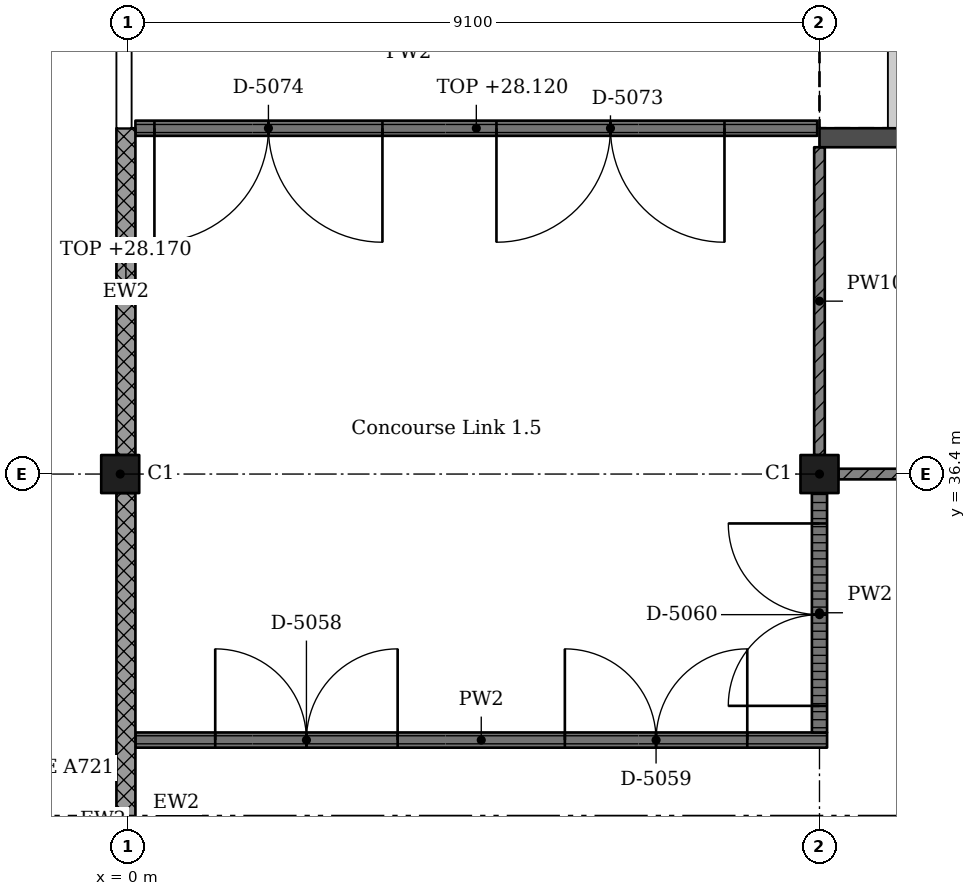
"""IFC4 building model, lengths in metres.
Left out: names, types, materials, properties, quantities, classifications, styles, units other than length and angle.
Written with IfcOpenShell. Run it as: python <this file> out.ifc"""

import sys

from ifc_helpers import new_model, si_unit, direction, frame, frame_2d, origin, origin_2d, place, context, subcontext, project, spatial, rectangle, extrude, element, fill, save


model = new_model("IFC4")
c1 = context("Model", 3, precision=1e-05, world=origin(), true_north=direction((0.0, 1.0)))
c2 = subcontext(c1, "Body", "Model", "MODEL_VIEW")
j1 = project(units=[si_unit("LENGTHUNIT", "METRE"), si_unit("PLANEANGLEUNIT", "RADIAN")], contexts=[c1])
p1 = place(None, origin())
s1 = spatial("IfcSite", under=j1, at=p1, CompositionType="ELEMENT")
p2 = place(p1, origin())
s2 = spatial("IfcBuilding", under=s1, at=p2, CompositionType="ELEMENT")
p3 = place(p2, frame((0.0, 0.0, 24.57)))
s3 = spatial("IfcBuildingStorey", under=s2, at=p3, CompositionType="ELEMENT", Elevation=24.57)
for number, where, z_axis, x_axis in (
    (1, (-0.1, 36.4, 0.0), (0.0, 0.0, 1.0), (1.0, 0.0, 0.0)),
    (2, (9.1, 36.4, 0.0), (0.0, 0.0, 1.0), (1.0, 0.0, 0.0)),
):
    element("IfcColumn", number, at=place(p3, frame(where, z_axis=z_axis, x_axis=x_axis)), inside=s3, PredefinedType="COLUMN", context=c2, shape_type="SweptSolid", body=[
        extrude(rectangle(XDim=0.5, YDim=0.5, at=origin_2d()), origin(), (0.0, 0.0, 1.0), 4.55),
    ])
p4 = place(p3, frame((40.95, 40.825, 0.0), z_axis=(0.0, 0.0, 1.0), x_axis=(-1.0, 0.0, 0.0)))
e3 = element("IfcWall", 3, at=p4, inside=s3, PredefinedType="SHEAR", context=c2, shape_type="SweptSolid", body=[
    extrude(rectangle(XDim=31.85, YDim=0.25, at=frame_2d((15.925, 0.0))), origin(), (0.0, 0.0, 1.0), 4.55),
])
p5 = place(p3, frame((-0.025, 40.95, 0.0), z_axis=(0.0, 0.0, 1.0), x_axis=(0.0, -1.0, 0.0)))
e4 = element("IfcWall", 4, at=p5, inside=s3, PredefinedType="SOLIDWALL", context=c2, shape_type="SweptSolid", body=[
    extrude(rectangle(XDim=4.3, YDim=0.25, at=frame_2d((2.15, 0.0))), origin(), (0.0, 0.0, 1.0), 3.6),
])
p6 = place(p3, frame((-0.025, 36.15, 0.0), z_axis=(0.0, 0.0, 1.0), x_axis=(0.0, -1.0, 0.0)))
e5 = element("IfcWall", 5, at=p6, inside=s3, PredefinedType="SOLIDWALL", context=c2, shape_type="SweptSolid", body=[
    extrude(rectangle(XDim=8.6, YDim=0.25, at=frame_2d((4.3, 0.0))), origin(), (0.0, 0.0, 1.0), 3.6),
])
p7 = place(p3, frame((0.1, 32.9, 0.0), z_axis=(0.0, 0.0, 1.0), x_axis=(1.0, 0.0, 0.0)))
e6 = element("IfcWall", 6, at=p7, inside=s3, PredefinedType="PARTITIONING", context=c2, shape_type="SweptSolid", body=[
    extrude(rectangle(XDim=9.1, YDim=0.2, at=frame_2d((4.55, 0.0))), origin(), (0.0, 0.0, 1.0), 4.35),
])
p8 = place(p7, frame((1.05, 0.0, 0.0)))
e7 = element("IfcOpeningElement", 7, at=p8, cuts=e6, PredefinedType="OPENING", context=c2, shape_type="SweptSolid", body=[
    extrude(rectangle(XDim=2.4, YDim=2.4, at=frame_2d((1.2, 1.2))), frame((0.0, 0.11, 0.0), z_axis=(0.0, -1.0, 0.0), x_axis=(1.0, 0.0, 0.0)), (0.0, 0.0, 1.0), 0.22),
])
p9 = place(p7, frame((5.65, 0.0, 0.0)))
e8 = element("IfcOpeningElement", 8, at=p9, cuts=e6, PredefinedType="OPENING", context=c2, shape_type="SweptSolid", body=[
    extrude(rectangle(XDim=2.4, YDim=2.4, at=frame_2d((1.2, 1.2))), frame((0.0, 0.11, 0.0), z_axis=(0.0, -1.0, 0.0), x_axis=(1.0, 0.0, 0.0)), (0.0, 0.0, 1.0), 0.22),
])
p10 = place(p3, frame((0.1, 40.95, 0.0), z_axis=(0.0, 0.0, 1.0), x_axis=(1.0, 0.0, 0.0)))
e9 = element("IfcWall", 9, at=p10, inside=s3, PredefinedType="PARTITIONING", context=c2, shape_type="SweptSolid", body=[
    extrude(rectangle(XDim=8.97, YDim=0.2, at=frame_2d((4.485, 0.0))), origin(), (0.0, 0.0, 1.0), 3.55),
])
p11 = place(p10, frame((4.75, 0.0, 0.0)))
e10 = element("IfcOpeningElement", 10, at=p11, cuts=e9, PredefinedType="OPENING", context=c2, shape_type="SweptSolid", body=[
    extrude(rectangle(XDim=3.0, YDim=2.4, at=frame_2d((1.5, 1.2))), frame((0.0, 0.11, 0.0), z_axis=(0.0, -1.0, 0.0), x_axis=(1.0, 0.0, 0.0)), (0.0, 0.0, 1.0), 0.22),
])
p12 = place(p10, frame((0.25, 0.0, 0.0)))
e11 = element("IfcOpeningElement", 11, at=p12, cuts=e9, PredefinedType="OPENING", context=c2, shape_type="SweptSolid", body=[
    extrude(rectangle(XDim=3.0, YDim=2.4, at=frame_2d((1.5, 1.2))), frame((0.0, 0.11, 0.0), z_axis=(0.0, -1.0, 0.0), x_axis=(1.0, 0.0, 0.0)), (0.0, 0.0, 1.0), 0.22),
])
p13 = place(p3, frame((9.1, 33.0, 0.0), z_axis=(0.0, 0.0, 1.0), x_axis=(0.0, 1.0, 0.0)))
e12 = element("IfcWall", 12, at=p13, inside=s3, PredefinedType="PARTITIONING", context=c2, shape_type="SweptSolid", body=[
    extrude(rectangle(XDim=3.15, YDim=0.2, at=frame_2d((1.575, 0.0))), origin(), (0.0, 0.0, 1.0), 3.6),
])
p14 = place(p13, frame((0.35, 0.0, 0.0)))
e13 = element("IfcOpeningElement", 13, at=p14, cuts=e12, PredefinedType="OPENING", context=c2, shape_type="SweptSolid", body=[
    extrude(rectangle(XDim=2.4, YDim=2.4, at=frame_2d((1.2, 1.2))), frame((0.0, 0.11, 0.0), z_axis=(0.0, -1.0, 0.0), x_axis=(1.0, 0.0, 0.0)), (0.0, 0.0, 1.0), 0.22),
])
p15 = place(p3, frame((9.1, 36.65, 0.0), z_axis=(0.0, 0.0, 1.0), x_axis=(0.0, 1.0, 0.0)))
e14 = element("IfcWall", 14, at=p15, inside=s3, PredefinedType="SOLIDWALL", context=c2, shape_type="SweptSolid", body=[
    extrude(rectangle(XDim=4.05, YDim=0.14, at=frame_2d((2.025, 0.0))), origin(), (0.0, 0.0, 1.0), 3.6),
])
p16 = place(p3, frame((17.9, 36.4, 0.0), z_axis=(0.0, 0.0, 1.0), x_axis=(-1.0, 0.0, 0.0)))
e15 = element("IfcWall", 15, at=p16, inside=s3, PredefinedType="SOLIDWALL", context=c2, shape_type="SweptSolid", body=[
    extrude(rectangle(XDim=8.55, YDim=0.14, at=frame_2d((4.275, 0.0))), origin(), (0.0, 0.0, 1.0), 3.6),
])
p17 = place(p16, frame((3.55, 0.0, 0.0)))
e16 = element("IfcOpeningElement", 16, at=p17, cuts=e15, PredefinedType="OPENING", context=c2, shape_type="SweptSolid", body=[
    extrude(rectangle(XDim=1.5, YDim=2.1, at=frame_2d((0.75, 1.05))), frame((0.0, 0.08, 0.0), z_axis=(0.0, -1.0, 0.0), x_axis=(1.0, 0.0, 0.0)), (0.0, 0.0, 1.0), 0.16),
])
p18 = place(p8, origin())
e17 = element("IfcDoor", 17, at=p18, inside=s3, OperationType="DOUBLE_DOOR_SINGLE_SWING", PredefinedType="DOOR", context=c2, shape_type="SweptSolid", body=[
    extrude(rectangle(XDim=2.4, YDim=2.4, at=frame_2d((1.2, 1.2))), frame((0.0, 0.025, 0.0), z_axis=(0.0, -1.0, 0.0), x_axis=(1.0, 0.0, 0.0)), (0.0, 0.0, 1.0), 0.05),
])
fill(e7, e17)
p19 = place(p9, origin())
e18 = element("IfcDoor", 18, at=p19, inside=s3, OperationType="DOUBLE_DOOR_SINGLE_SWING", PredefinedType="DOOR", context=c2, shape_type="SweptSolid", body=[
    extrude(rectangle(XDim=2.4, YDim=2.4, at=frame_2d((1.2, 1.2))), frame((0.0, 0.025, 0.0), z_axis=(0.0, -1.0, 0.0), x_axis=(1.0, 0.0, 0.0)), (0.0, 0.0, 1.0), 0.05),
])
fill(e8, e18)
p20 = place(p14, origin())
e19 = element("IfcDoor", 19, at=p20, inside=s3, OperationType="DOUBLE_DOOR_SINGLE_SWING", PredefinedType="DOOR", context=c2, shape_type="SweptSolid", body=[
    extrude(rectangle(XDim=2.4, YDim=2.4, at=frame_2d((1.2, 1.2))), frame((0.0, 0.025, 0.0), z_axis=(0.0, -1.0, 0.0), x_axis=(1.0, 0.0, 0.0)), (0.0, 0.0, 1.0), 0.05),
])
fill(e13, e19)
p21 = place(p11, origin())
e20 = element("IfcDoor", 20, at=p21, inside=s3, OperationType="DOUBLE_DOOR_SINGLE_SWING", PredefinedType="DOOR", context=c2, shape_type="SweptSolid", body=[
    extrude(rectangle(XDim=3.0, YDim=2.4, at=frame_2d((1.5, 1.2))), frame((0.0, 0.025, 0.0), z_axis=(0.0, -1.0, 0.0), x_axis=(1.0, 0.0, 0.0)), (0.0, 0.0, 1.0), 0.05),
])
fill(e10, e20)
p22 = place(p12, origin())
e21 = element("IfcDoor", 21, at=p22, inside=s3, OperationType="DOUBLE_DOOR_SINGLE_SWING", PredefinedType="DOOR", context=c2, shape_type="SweptSolid", body=[
    extrude(rectangle(XDim=3.0, YDim=2.4, at=frame_2d((1.5, 1.2))), frame((0.0, 0.025, 0.0), z_axis=(0.0, -1.0, 0.0), x_axis=(1.0, 0.0, 0.0)), (0.0, 0.0, 1.0), 0.05),
])
fill(e11, e21)
save(model, sys.argv[1])
